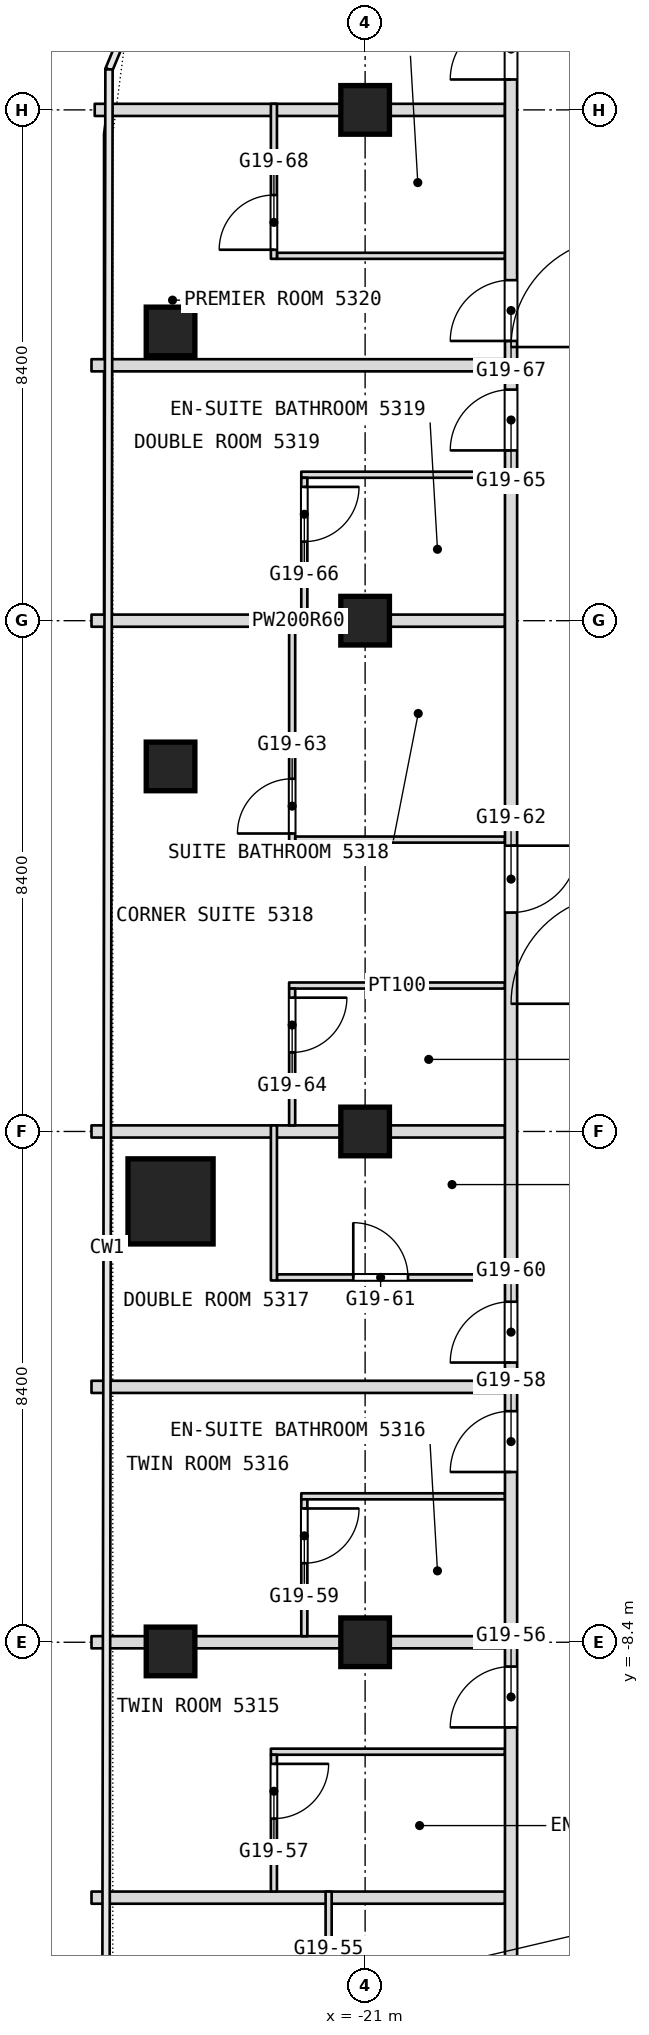
"""IFC4 building model, lengths in metres.
Left out: names, types, materials, properties, quantities, classifications, styles, units other than length and angle.
Written with IfcOpenShell. Run it as: python <this file> out.ifc"""

import sys

from ifc_helpers import new_model, si_unit, direction, frame, frame_2d, origin, origin_2d, place, context, subcontext, project, spatial, rectangle, extrude, element, fill, save


model = new_model("IFC4")
c1 = context("Model", 3, precision=1e-05, world=origin(), true_north=direction((0.0, 1.0)))
c2 = subcontext(c1, "Body", "Model", "MODEL_VIEW")
j1 = project(units=[si_unit("LENGTHUNIT", "METRE"), si_unit("PLANEANGLEUNIT", "RADIAN")], contexts=[c1])
p1 = place(None, origin())
s1 = spatial("IfcSite", under=j1, at=p1, CompositionType="ELEMENT")
p2 = place(p1, origin())
s2 = spatial("IfcBuilding", under=s1, at=p2, CompositionType="ELEMENT")
p3 = place(p2, frame((0.0, 0.0, 227.3)))
s3 = spatial("IfcBuildingStorey", under=s2, at=p3, CompositionType="ELEMENT", Elevation=227.3)
p4 = place(p3, frame((-24.2, -1.15, 0.0), z_axis=(0.0, 0.0, 1.0), x_axis=(1.0, 0.0, 0.0)))
e1 = element("IfcColumn", 1, at=p4, inside=s3, PredefinedType="COLUMN", context=c2, shape_type="SweptSolid", body=[
    extrude(rectangle(XDim=1.4, YDim=1.4, at=origin_2d()), origin(), (0.0, 0.0, 1.0), 3.6),
])
for number, where, z_axis, x_axis in (
    (2, (-21.0, -8.4, 0.0), (0.0, 0.0, 1.0), (1.0, 0.0, 0.0)),
    (3, (-21.0, 0.0, 0.0), (0.0, 0.0, 1.0), (1.0, 0.0, 0.0)),
    (4, (-21.0, 8.4, 0.0), (0.0, 0.0, 1.0), (1.0, 0.0, 0.0)),
    (5, (-21.0, 16.8, 0.0), (0.0, 0.0, 1.0), (1.0, 0.0, 0.0)),
    (6, (-24.2, -8.551, 0.0), (0.0, 0.0, 1.0), (1.0, 0.0, 0.0)),
    (7, (-24.2, 6.003, 0.0), (0.0, 0.0, 1.0), (1.0, 0.0, 0.0)),
    (8, (-24.2, 13.156, 0.0), (0.0, 0.0, 1.0), (1.0, 0.0, 0.0)),
):
    element("IfcColumn", number, at=place(p3, frame(where, z_axis=z_axis, x_axis=x_axis)), inside=s3, PredefinedType="COLUMN", context=c2, shape_type="SweptSolid", body=[
        extrude(rectangle(XDim=0.8, YDim=0.8, at=origin_2d()), origin(), (0.0, 0.0, 1.0), 3.6),
    ])
p5 = place(p3, frame((-25.5, -12.6, 0.0), z_axis=(0.0, 0.0, 1.0), x_axis=(1.0, 0.0, 0.0)))
e9 = element("IfcWall", 9, at=p5, inside=s3, PredefinedType="PARTITIONING", context=c2, shape_type="SweptSolid", body=[
    extrude(rectangle(XDim=6.8, YDim=0.2, at=frame_2d((3.4, 0.0))), origin(), (0.0, 0.0, 1.0), 3.34),
])
p6 = place(p3, frame((-22.55, -10.2, 0.0), z_axis=(0.0, 0.0, 1.0), x_axis=(1.0, 0.0, 0.0)))
e10 = element("IfcWall", 10, at=p6, inside=s3, PredefinedType="PARTITIONING", context=c2, shape_type="SweptSolid", body=[
    extrude(rectangle(XDim=3.85, YDim=0.1, at=frame_2d((1.925, 0.0))), origin(), (0.0, 0.0, 1.0), 3.34),
])
p7 = place(p3, frame((-25.5, -8.4, 0.0), z_axis=(0.0, 0.0, 1.0), x_axis=(1.0, 0.0, 0.0)))
e11 = element("IfcWall", 11, at=p7, inside=s3, PredefinedType="PARTITIONING", context=c2, shape_type="SweptSolid", body=[
    extrude(rectangle(XDim=6.8, YDim=0.2, at=frame_2d((3.4, 0.0))), origin(), (0.0, 0.0, 1.0), 2.94),
])
p8 = place(p3, frame((-22.05, -6.0, 0.0), z_axis=(0.0, 0.0, 1.0), x_axis=(1.0, 0.0, 0.0)))
e12 = element("IfcWall", 12, at=p8, inside=s3, PredefinedType="PARTITIONING", context=c2, shape_type="SweptSolid", body=[
    extrude(rectangle(XDim=3.35, YDim=0.1, at=frame_2d((1.675, 0.0))), origin(), (0.0, 0.0, 1.0), 3.34),
])
p9 = place(p3, frame((-25.5, -4.2, 0.0), z_axis=(0.0, 0.0, 1.0), x_axis=(1.0, 0.0, 0.0)))
e13 = element("IfcWall", 13, at=p9, inside=s3, PredefinedType="PARTITIONING", context=c2, shape_type="SweptSolid", body=[
    extrude(rectangle(XDim=6.8, YDim=0.2, at=frame_2d((3.4, 0.0))), origin(), (0.0, 0.0, 1.0), 3.34),
])
p10 = place(p3, frame((-22.45, -2.4, 0.0), z_axis=(0.0, 0.0, 1.0), x_axis=(1.0, 0.0, 0.0)))
e14 = element("IfcWall", 14, at=p10, inside=s3, PredefinedType="PARTITIONING", context=c2, shape_type="SweptSolid", body=[
    extrude(rectangle(XDim=3.75, YDim=0.1, at=frame_2d((1.875, 0.0))), origin(), (0.0, 0.0, 1.0), 3.34),
])
p11 = place(p10, frame((1.255, 0.0, 0.0)))
e15 = element("IfcOpeningElement", 15, at=p11, cuts=e14, PredefinedType="OPENING", context=c2, shape_type="SweptSolid", body=[
    extrude(rectangle(XDim=0.9, YDim=2.1, at=frame_2d((0.45, 1.05))), frame((0.0, 0.05, 0.0), z_axis=(0.0, -1.0, 0.0), x_axis=(1.0, 0.0, 0.0)), (0.0, 0.0, 1.0), 0.1),
])
p12 = place(p3, frame((-25.5, 0.0, 0.0), z_axis=(0.0, 0.0, 1.0), x_axis=(1.0, 0.0, 0.0)))
e16 = element("IfcWall", 16, at=p12, inside=s3, PredefinedType="PARTITIONING", context=c2, shape_type="SweptSolid", body=[
    extrude(rectangle(XDim=6.8, YDim=0.2, at=frame_2d((3.4, 0.0))), origin(), (0.0, 0.0, 1.0), 2.94),
])
p13 = place(p3, frame((-22.25, 2.4, 0.0), z_axis=(0.0, 0.0, 1.0), x_axis=(1.0, 0.0, 0.0)))
e17 = element("IfcWall", 17, at=p13, inside=s3, PredefinedType="PARTITIONING", context=c2, shape_type="SweptSolid", body=[
    extrude(rectangle(XDim=3.55, YDim=0.1, at=frame_2d((1.775, 0.0))), origin(), (0.0, 0.0, 1.0), 3.34),
])
p14 = place(p3, frame((-22.15, 4.8, 0.0), z_axis=(0.0, 0.0, 1.0), x_axis=(1.0, 0.0, 0.0)))
e18 = element("IfcWall", 18, at=p14, inside=s3, PredefinedType="PARTITIONING", context=c2, shape_type="SweptSolid", body=[
    extrude(rectangle(XDim=3.45, YDim=0.1, at=frame_2d((1.725, 0.0))), origin(), (0.0, 0.0, 1.0), 3.34),
])
p15 = place(p3, frame((-25.5, 8.4, 0.0), z_axis=(0.0, 0.0, 1.0), x_axis=(1.0, 0.0, 0.0)))
e19 = element("IfcWall", 19, at=p15, inside=s3, PredefinedType="PARTITIONING", context=c2, shape_type="SweptSolid", body=[
    extrude(rectangle(XDim=6.8, YDim=0.2, at=frame_2d((3.4, 0.0))), origin(), (0.0, 0.0, 1.0), 2.94),
])
p16 = place(p3, frame((-22.05, 10.8, 0.0), z_axis=(0.0, 0.0, 1.0), x_axis=(1.0, 0.0, 0.0)))
e20 = element("IfcWall", 20, at=p16, inside=s3, PredefinedType="PARTITIONING", context=c2, shape_type="SweptSolid", body=[
    extrude(rectangle(XDim=3.35, YDim=0.1, at=frame_2d((1.675, 0.0))), origin(), (0.0, 0.0, 1.0), 3.34),
])
p17 = place(p3, frame((-25.5, 12.6, 0.0), z_axis=(0.0, 0.0, 1.0), x_axis=(1.0, 0.0, 0.0)))
e21 = element("IfcWall", 21, at=p17, inside=s3, PredefinedType="PARTITIONING", context=c2, shape_type="SweptSolid", body=[
    extrude(rectangle(XDim=6.8, YDim=0.2, at=frame_2d((3.4, 0.0))), origin(), (0.0, 0.0, 1.0), 3.34),
])
p18 = place(p3, frame((-22.45, 14.4, 0.0), z_axis=(0.0, 0.0, 1.0), x_axis=(1.0, 0.0, 0.0)))
e22 = element("IfcWall", 22, at=p18, inside=s3, PredefinedType="PARTITIONING", context=c2, shape_type="SweptSolid", body=[
    extrude(rectangle(XDim=3.75, YDim=0.1, at=frame_2d((1.875, 0.0))), origin(), (0.0, 0.0, 1.0), 3.34),
])
p19 = place(p3, frame((-25.447, 16.8, 0.0), z_axis=(0.0, 0.0, 1.0), x_axis=(1.0, 0.0, 0.0)))
e23 = element("IfcWall", 23, at=p19, inside=s3, PredefinedType="PARTITIONING", context=c2, shape_type="SweptSolid", body=[
    extrude(rectangle(XDim=6.747, YDim=0.2, at=frame_2d((3.374, 0.0))), origin(), (0.0, 0.0, 1.0), 2.94),
])
p20 = place(p3, frame((-18.6, -26.751, 0.0), z_axis=(0.0, 0.0, 1.0), x_axis=(0.0, 1.0, 0.0)))
e24 = element("IfcWall", 24, at=p20, inside=s3, PredefinedType="PARTITIONING", context=c2, shape_type="SweptSolid", body=[
    extrude(rectangle(XDim=49.091, YDim=0.2, at=frame_2d((24.545, 0.0))), origin(), (0.0, 0.0, 1.0), 3.34),
])
p21 = place(p20, frame((3.413, 0.0, 0.0)))
e25 = element("IfcOpeningElement", 25, at=p21, cuts=e24, PredefinedType="OPENING", context=c2, shape_type="SweptSolid", body=[
    extrude(rectangle(XDim=1.0, YDim=2.1, at=frame_2d((0.5, 1.05))), frame((0.0, 0.1, 0.0), z_axis=(0.0, -1.0, 0.0), x_axis=(1.0, 0.0, 0.0)), (0.0, 0.0, 1.0), 0.2),
])
p22 = place(p20, frame((5.838, 0.0, 0.0)))
e26 = element("IfcOpeningElement", 26, at=p22, cuts=e24, PredefinedType="OPENING", context=c2, shape_type="SweptSolid", body=[
    extrude(rectangle(XDim=1.0, YDim=2.1, at=frame_2d((0.5, 1.05))), frame((0.0, 0.1, 0.0), z_axis=(0.0, -1.0, 0.0), x_axis=(1.0, 0.0, 0.0)), (0.0, 0.0, 1.0), 0.2),
])
p23 = place(p20, frame((10.351, 0.0, 0.0)))
e27 = element("IfcOpeningElement", 27, at=p23, cuts=e24, PredefinedType="OPENING", context=c2, shape_type="SweptSolid", body=[
    extrude(rectangle(XDim=1.0, YDim=2.1, at=frame_2d((0.5, 1.05))), frame((0.0, 0.1, 0.0), z_axis=(0.0, -1.0, 0.0), x_axis=(1.0, 0.0, 0.0)), (0.0, 0.0, 1.0), 0.2),
])
p24 = place(p20, frame((16.951, 0.0, 0.0)))
e28 = element("IfcOpeningElement", 28, at=p24, cuts=e24, PredefinedType="OPENING", context=c2, shape_type="SweptSolid", body=[
    extrude(rectangle(XDim=1.0, YDim=2.1, at=frame_2d((0.5, 1.05))), frame((0.0, 0.1, 0.0), z_axis=(0.0, -1.0, 0.0), x_axis=(1.0, 0.0, 0.0)), (0.0, 0.0, 1.0), 0.2),
])
p25 = place(p20, frame((21.151, 0.0, 0.0)))
e29 = element("IfcOpeningElement", 29, at=p25, cuts=e24, PredefinedType="OPENING", context=c2, shape_type="SweptSolid", body=[
    extrude(rectangle(XDim=1.0, YDim=2.1, at=frame_2d((0.5, 1.05))), frame((0.0, 0.1, 0.0), z_axis=(0.0, -1.0, 0.0), x_axis=(1.0, 0.0, 0.0)), (0.0, 0.0, 1.0), 0.2),
])
p26 = place(p20, frame((22.951, 0.0, 0.0)))
e30 = element("IfcOpeningElement", 30, at=p26, cuts=e24, PredefinedType="OPENING", context=c2, shape_type="SweptSolid", body=[
    extrude(rectangle(XDim=1.0, YDim=2.1, at=frame_2d((0.5, 1.05))), frame((0.0, 0.1, 0.0), z_axis=(0.0, -1.0, 0.0), x_axis=(1.0, 0.0, 0.0)), (0.0, 0.0, 1.0), 0.2),
])
p27 = place(p20, frame((30.351, 0.0, 0.0)))
e31 = element("IfcOpeningElement", 31, at=p27, cuts=e24, PredefinedType="OPENING", context=c2, shape_type="SweptSolid", body=[
    extrude(rectangle(XDim=1.1, YDim=2.1, at=frame_2d((0.55, 1.05))), frame((0.0, 0.1, 0.0), z_axis=(0.0, -1.0, 0.0), x_axis=(1.0, 0.0, 0.0)), (0.0, 0.0, 1.0), 0.2),
])
p28 = place(p20, frame((37.951, 0.0, 0.0)))
e32 = element("IfcOpeningElement", 32, at=p28, cuts=e24, PredefinedType="OPENING", context=c2, shape_type="SweptSolid", body=[
    extrude(rectangle(XDim=1.0, YDim=2.1, at=frame_2d((0.5, 1.05))), frame((0.0, 0.1, 0.0), z_axis=(0.0, -1.0, 0.0), x_axis=(1.0, 0.0, 0.0)), (0.0, 0.0, 1.0), 0.2),
])
p29 = place(p20, frame((39.751, 0.0, 0.0)))
e33 = element("IfcOpeningElement", 33, at=p29, cuts=e24, PredefinedType="OPENING", context=c2, shape_type="SweptSolid", body=[
    extrude(rectangle(XDim=1.0, YDim=2.1, at=frame_2d((0.5, 1.05))), frame((0.0, 0.1, 0.0), z_axis=(0.0, -1.0, 0.0), x_axis=(1.0, 0.0, 0.0)), (0.0, 0.0, 1.0), 0.2),
])
p30 = place(p20, frame((44.051, 0.0, 0.0)))
e34 = element("IfcOpeningElement", 34, at=p30, cuts=e24, PredefinedType="OPENING", context=c2, shape_type="SweptSolid", body=[
    extrude(rectangle(XDim=1.0, YDim=2.1, at=frame_2d((0.5, 1.05))), frame((0.0, 0.1, 0.0), z_axis=(0.0, -1.0, 0.0), x_axis=(1.0, 0.0, 0.0)), (0.0, 0.0, 1.0), 0.2),
])
p31 = place(p3, frame((-21.6, -15.05, 0.0), z_axis=(0.0, 0.0, 1.0), x_axis=(0.0, 1.0, 0.0)))
e35 = element("IfcWall", 35, at=p31, inside=s3, PredefinedType="PARTITIONING", context=c2, shape_type="SweptSolid", body=[
    extrude(rectangle(XDim=2.55, YDim=0.1, at=frame_2d((1.275, 0.0))), origin(), (0.0, 0.0, 1.0), 3.34),
])
p32 = place(p31, frame((0.15, 0.0, 0.0)))
e36 = element("IfcOpeningElement", 36, at=p32, cuts=e35, PredefinedType="OPENING", context=c2, shape_type="SweptSolid", body=[
    extrude(rectangle(XDim=0.9, YDim=2.1, at=frame_2d((0.45, 1.05))), frame((0.0, 0.05, 0.0), z_axis=(0.0, -1.0, 0.0), x_axis=(1.0, 0.0, 0.0)), (0.0, 0.0, 1.0), 0.1),
])
p33 = place(p3, frame((-22.0, -8.3, 0.0), z_axis=(0.0, 0.0, 1.0), x_axis=(0.0, 1.0, 0.0)))
e37 = element("IfcWall", 37, at=p33, inside=s3, PredefinedType="PARTITIONING", context=c2, shape_type="SweptSolid", body=[
    extrude(rectangle(XDim=2.25, YDim=0.1, at=frame_2d((1.125, 0.0))), origin(), (0.0, 0.0, 1.0), 3.34),
])
p34 = place(p33, frame((1.2, 0.0, 0.0)))
e38 = element("IfcOpeningElement", 38, at=p34, cuts=e37, PredefinedType="OPENING", context=c2, shape_type="SweptSolid", body=[
    extrude(rectangle(XDim=0.9, YDim=2.1, at=frame_2d((0.45, 1.05))), frame((0.0, 0.05, 0.0), z_axis=(0.0, -1.0, 0.0), x_axis=(1.0, 0.0, 0.0)), (0.0, 0.0, 1.0), 0.1),
])
p35 = place(p3, frame((-22.0, 8.5, 0.0), z_axis=(0.0, 0.0, 1.0), x_axis=(0.0, 1.0, 0.0)))
e39 = element("IfcWall", 39, at=p35, inside=s3, PredefinedType="PARTITIONING", context=c2, shape_type="SweptSolid", body=[
    extrude(rectangle(XDim=2.25, YDim=0.1, at=frame_2d((1.125, 0.0))), origin(), (0.0, 0.0, 1.0), 3.34),
])
p36 = place(p35, frame((1.2, 0.0, 0.0)))
e40 = element("IfcOpeningElement", 40, at=p36, cuts=e39, PredefinedType="OPENING", context=c2, shape_type="SweptSolid", body=[
    extrude(rectangle(XDim=0.9, YDim=2.1, at=frame_2d((0.45, 1.05))), frame((0.0, 0.05, 0.0), z_axis=(0.0, -1.0, 0.0), x_axis=(1.0, 0.0, 0.0)), (0.0, 0.0, 1.0), 0.1),
])
p37 = place(p3, frame((-22.2, 0.1, 0.0), z_axis=(0.0, 0.0, 1.0), x_axis=(0.0, 1.0, 0.0)))
e41 = element("IfcWall", 41, at=p37, inside=s3, PredefinedType="PARTITIONING", context=c2, shape_type="SweptSolid", body=[
    extrude(rectangle(XDim=2.25, YDim=0.1, at=frame_2d((1.125, 0.0))), origin(), (0.0, 0.0, 1.0), 3.34),
])
p38 = place(p37, frame((1.2, 0.0, 0.0)))
e42 = element("IfcOpeningElement", 42, at=p38, cuts=e41, PredefinedType="OPENING", context=c2, shape_type="SweptSolid", body=[
    extrude(rectangle(XDim=0.9, YDim=2.1, at=frame_2d((0.45, 1.05))), frame((0.0, 0.05, 0.0), z_axis=(0.0, -1.0, 0.0), x_axis=(1.0, 0.0, 0.0)), (0.0, 0.0, 1.0), 0.1),
])
p39 = place(p3, frame((-22.2, 4.75, 0.0), z_axis=(0.0, 0.0, 1.0), x_axis=(0.0, 1.0, 0.0)))
e43 = element("IfcWall", 43, at=p39, inside=s3, PredefinedType="PARTITIONING", context=c2, shape_type="SweptSolid", body=[
    extrude(rectangle(XDim=3.75, YDim=0.1, at=frame_2d((1.875, 0.0))), origin(), (0.0, 0.0, 1.0), 3.34),
])
p40 = place(p39, frame((0.15, 0.0, 0.0)))
e44 = element("IfcOpeningElement", 44, at=p40, cuts=e43, PredefinedType="OPENING", context=c2, shape_type="SweptSolid", body=[
    extrude(rectangle(XDim=0.9, YDim=2.1, at=frame_2d((0.45, 1.05))), frame((0.0, 0.05, 0.0), z_axis=(0.0, -1.0, 0.0), x_axis=(1.0, 0.0, 0.0)), (0.0, 0.0, 1.0), 0.1),
])
p41 = place(p3, frame((-22.5, -12.5, 0.0), z_axis=(0.0, 0.0, 1.0), x_axis=(0.0, 1.0, 0.0)))
e45 = element("IfcWall", 45, at=p41, inside=s3, PredefinedType="PARTITIONING", context=c2, shape_type="SweptSolid", body=[
    extrude(rectangle(XDim=2.25, YDim=0.1, at=frame_2d((1.125, 0.0))), origin(), (0.0, 0.0, 1.0), 3.34),
])
p42 = place(p41, frame((1.2, 0.0, 0.0)))
e46 = element("IfcOpeningElement", 46, at=p42, cuts=e45, PredefinedType="OPENING", context=c2, shape_type="SweptSolid", body=[
    extrude(rectangle(XDim=0.9, YDim=2.1, at=frame_2d((0.45, 1.05))), frame((0.0, 0.05, 0.0), z_axis=(0.0, -1.0, 0.0), x_axis=(1.0, 0.0, 0.0)), (0.0, 0.0, 1.0), 0.1),
])
p43 = place(p3, frame((-22.5, -2.45, 0.0), z_axis=(0.0, 0.0, 1.0), x_axis=(0.0, 1.0, 0.0)))
e47 = element("IfcWall", 47, at=p43, inside=s3, PredefinedType="PARTITIONING", context=c2, shape_type="SweptSolid", body=[
    extrude(rectangle(XDim=2.55, YDim=0.1, at=frame_2d((1.275, 0.0))), origin(), (0.0, 0.0, 1.0), 3.34),
])
p44 = place(p3, frame((-22.5, 14.35, 0.0), z_axis=(0.0, 0.0, 1.0), x_axis=(0.0, 1.0, 0.0)))
e48 = element("IfcWall", 48, at=p44, inside=s3, PredefinedType="PARTITIONING", context=c2, shape_type="SweptSolid", body=[
    extrude(rectangle(XDim=2.55, YDim=0.1, at=frame_2d((1.275, 0.0))), origin(), (0.0, 0.0, 1.0), 3.34),
])
p45 = place(p44, frame((0.15, 0.0, 0.0)))
e49 = element("IfcOpeningElement", 49, at=p45, cuts=e48, PredefinedType="OPENING", context=c2, shape_type="SweptSolid", body=[
    extrude(rectangle(XDim=0.9, YDim=2.1, at=frame_2d((0.45, 1.05))), frame((0.0, 0.05, 0.0), z_axis=(0.0, -1.0, 0.0), x_axis=(1.0, 0.0, 0.0)), (0.0, 0.0, 1.0), 0.1),
])
p46 = place(p11, origin())
e50 = element("IfcDoor", 50, at=p46, inside=s3, OperationType="SINGLE_SWING_LEFT", PredefinedType="DOOR", context=c2, shape_type="SweptSolid", body=[
    extrude(rectangle(XDim=0.9, YDim=2.1, at=frame_2d((0.45, 1.05))), frame((0.0, 0.025, 0.0), z_axis=(0.0, -1.0, 0.0), x_axis=(1.0, 0.0, 0.0)), (0.0, 0.0, 1.0), 0.05),
])
fill(e15, e50)
p47 = place(p24, origin())
e51 = element("IfcDoor", 51, at=p47, inside=s3, OperationType="SINGLE_SWING_LEFT", PredefinedType="DOOR", context=c2, shape_type="SweptSolid", body=[
    extrude(rectangle(XDim=1.0, YDim=2.1, at=frame_2d((0.5, 1.05))), frame((0.0, 0.025, 0.0), z_axis=(0.0, -1.0, 0.0), x_axis=(1.0, 0.0, 0.0)), (0.0, 0.0, 1.0), 0.05),
])
fill(e28, e51)
p48 = place(p25, origin())
e52 = element("IfcDoor", 52, at=p48, inside=s3, OperationType="SINGLE_SWING_LEFT", PredefinedType="DOOR", context=c2, shape_type="SweptSolid", body=[
    extrude(rectangle(XDim=1.0, YDim=2.1, at=frame_2d((0.5, 1.05))), frame((0.0, 0.025, 0.0), z_axis=(0.0, -1.0, 0.0), x_axis=(1.0, 0.0, 0.0)), (0.0, 0.0, 1.0), 0.05),
])
fill(e29, e52)
p49 = place(p26, origin())
e53 = element("IfcDoor", 53, at=p49, inside=s3, OperationType="SINGLE_SWING_LEFT", PredefinedType="DOOR", context=c2, shape_type="SweptSolid", body=[
    extrude(rectangle(XDim=1.0, YDim=2.1, at=frame_2d((0.5, 1.05))), frame((0.0, 0.025, 0.0), z_axis=(0.0, -1.0, 0.0), x_axis=(1.0, 0.0, 0.0)), (0.0, 0.0, 1.0), 0.05),
])
fill(e30, e53)
p50 = place(p27, origin())
e54 = element("IfcDoor", 54, at=p50, inside=s3, OperationType="SINGLE_SWING_RIGHT", PredefinedType="DOOR", context=c2, shape_type="SweptSolid", body=[
    extrude(rectangle(XDim=1.1, YDim=2.1, at=frame_2d((0.55, 1.05))), frame((0.0, 0.025, 0.0), z_axis=(0.0, -1.0, 0.0), x_axis=(1.0, 0.0, 0.0)), (0.0, 0.0, 1.0), 0.05),
])
fill(e31, e54)
p51 = place(p28, origin())
e55 = element("IfcDoor", 55, at=p51, inside=s3, OperationType="SINGLE_SWING_RIGHT", PredefinedType="DOOR", context=c2, shape_type="SweptSolid", body=[
    extrude(rectangle(XDim=1.0, YDim=2.1, at=frame_2d((0.5, 1.05))), frame((0.0, 0.025, 0.0), z_axis=(0.0, -1.0, 0.0), x_axis=(1.0, 0.0, 0.0)), (0.0, 0.0, 1.0), 0.05),
])
fill(e32, e55)
p52 = place(p29, origin())
e56 = element("IfcDoor", 56, at=p52, inside=s3, OperationType="SINGLE_SWING_RIGHT", PredefinedType="DOOR", context=c2, shape_type="SweptSolid", body=[
    extrude(rectangle(XDim=1.0, YDim=2.1, at=frame_2d((0.5, 1.05))), frame((0.0, 0.025, 0.0), z_axis=(0.0, -1.0, 0.0), x_axis=(1.0, 0.0, 0.0)), (0.0, 0.0, 1.0), 0.05),
])
fill(e33, e56)
p53 = place(p30, origin())
e57 = element("IfcDoor", 57, at=p53, inside=s3, OperationType="SINGLE_SWING_RIGHT", PredefinedType="DOOR", context=c2, shape_type="SweptSolid", body=[
    extrude(rectangle(XDim=1.0, YDim=2.1, at=frame_2d((0.5, 1.05))), frame((0.0, 0.025, 0.0), z_axis=(0.0, -1.0, 0.0), x_axis=(1.0, 0.0, 0.0)), (0.0, 0.0, 1.0), 0.05),
])
fill(e34, e57)
p54 = place(p34, origin())
e58 = element("IfcDoor", 58, at=p54, inside=s3, OperationType="SINGLE_SWING_LEFT", PredefinedType="DOOR", context=c2, shape_type="SweptSolid", body=[
    extrude(rectangle(XDim=0.9, YDim=2.1, at=frame_2d((0.45, 1.05))), frame((0.0, 0.025, 0.0), z_axis=(0.0, -1.0, 0.0), x_axis=(1.0, 0.0, 0.0)), (0.0, 0.0, 1.0), 0.05),
])
fill(e38, e58)
p55 = place(p36, origin())
e59 = element("IfcDoor", 59, at=p55, inside=s3, OperationType="SINGLE_SWING_LEFT", PredefinedType="DOOR", context=c2, shape_type="SweptSolid", body=[
    extrude(rectangle(XDim=0.9, YDim=2.1, at=frame_2d((0.45, 1.05))), frame((0.0, 0.025, 0.0), z_axis=(0.0, -1.0, 0.0), x_axis=(1.0, 0.0, 0.0)), (0.0, 0.0, 1.0), 0.05),
])
fill(e40, e59)
p56 = place(p38, origin())
e60 = element("IfcDoor", 60, at=p56, inside=s3, OperationType="SINGLE_SWING_LEFT", PredefinedType="DOOR", context=c2, shape_type="SweptSolid", body=[
    extrude(rectangle(XDim=0.9, YDim=2.1, at=frame_2d((0.45, 1.05))), frame((0.0, 0.025, 0.0), z_axis=(0.0, -1.0, 0.0), x_axis=(1.0, 0.0, 0.0)), (0.0, 0.0, 1.0), 0.05),
])
fill(e42, e60)
p57 = place(p40, origin())
e61 = element("IfcDoor", 61, at=p57, inside=s3, OperationType="SINGLE_SWING_RIGHT", PredefinedType="DOOR", context=c2, shape_type="SweptSolid", body=[
    extrude(rectangle(XDim=0.9, YDim=2.1, at=frame_2d((0.45, 1.05))), frame((0.0, 0.025, 0.0), z_axis=(0.0, -1.0, 0.0), x_axis=(1.0, 0.0, 0.0)), (0.0, 0.0, 1.0), 0.05),
])
fill(e44, e61)
p58 = place(p42, origin())
e62 = element("IfcDoor", 62, at=p58, inside=s3, OperationType="SINGLE_SWING_LEFT", PredefinedType="DOOR", context=c2, shape_type="SweptSolid", body=[
    extrude(rectangle(XDim=0.9, YDim=2.1, at=frame_2d((0.45, 1.05))), frame((0.0, 0.025, 0.0), z_axis=(0.0, -1.0, 0.0), x_axis=(1.0, 0.0, 0.0)), (0.0, 0.0, 1.0), 0.05),
])
fill(e46, e62)
p59 = place(p45, origin())
e63 = element("IfcDoor", 63, at=p59, inside=s3, OperationType="SINGLE_SWING_RIGHT", PredefinedType="DOOR", context=c2, shape_type="SweptSolid", body=[
    extrude(rectangle(XDim=0.9, YDim=2.1, at=frame_2d((0.45, 1.05))), frame((0.0, 0.025, 0.0), z_axis=(0.0, -1.0, 0.0), x_axis=(1.0, 0.0, 0.0)), (0.0, 0.0, 1.0), 0.05),
])
fill(e49, e63)
save(model, sys.argv[1])
